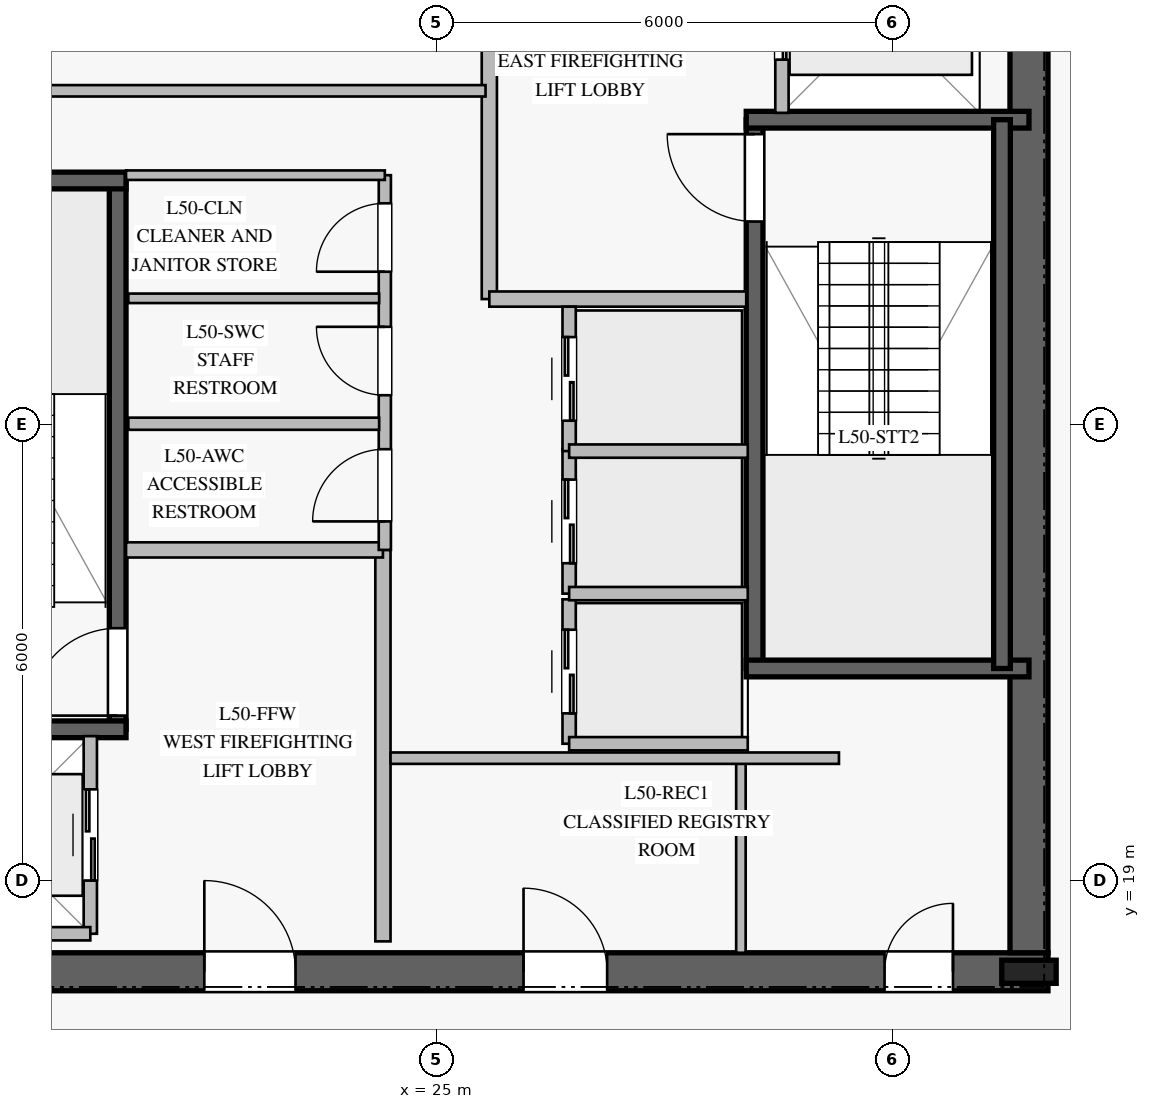
"""IFC4 building model, lengths in metres.
Left out: names, types, materials, properties, quantities, classifications, styles, units other than length and angle.
Written with IfcOpenShell. Run it as: python <this file> out.ifc"""

import sys

from ifc_helpers import new_model, si_unit, direction, frame, frame_2d, origin, origin_2d, place, context, subcontext, project, spatial, rectangle, i_section, extrude, element, fill, save


model = new_model("IFC4")
c1 = context("Model", 3, precision=1e-05, world=origin(), true_north=direction((0.0, 1.0)))
c2 = subcontext(c1, "Body", "Model", "MODEL_VIEW")
j1 = project(units=[si_unit("LENGTHUNIT", "METRE"), si_unit("PLANEANGLEUNIT", "RADIAN")], contexts=[c1])
p1 = place(None, origin())
s1 = spatial("IfcSite", under=j1, at=p1, CompositionType="ELEMENT")
p2 = place(p1, origin())
s2 = spatial("IfcBuilding", under=s1, at=p2, CompositionType="ELEMENT")
p3 = place(p2, frame((0.0, 0.0, 208.8)))
s3 = spatial("IfcBuildingStorey", under=s2, at=p3, CompositionType="ELEMENT", Elevation=208.8)
p4 = place(p3, frame((16.95, 17.8, 0.0), z_axis=(0.0, 0.0, 1.0), x_axis=(1.0, 0.0, 0.0)))
e1 = element("IfcWall", 1, at=p4, inside=s3, PredefinedType="SHEAR", context=c2, shape_type="SweptSolid", body=[
    extrude(rectangle(XDim=16.1, YDim=0.5, at=frame_2d((8.05, 0.0))), origin(), (0.0, 0.0, 1.0), 3.78),
])
p5 = place(p4, frame((5.0, 0.0, 0.0)))
e2 = element("IfcOpeningElement", 2, at=p5, cuts=e1, PredefinedType="OPENING", context=c2, shape_type="SweptSolid", body=[
    extrude(rectangle(XDim=1.2, YDim=2.25, at=frame_2d((0.6, 1.125))), frame((0.0, 0.26, 0.0), z_axis=(0.0, -1.0, 0.0), x_axis=(1.0, 0.0, 0.0)), (0.0, 0.0, 1.0), 0.52),
])
p6 = place(p4, frame((13.95, 0.0, 0.0)))
e3 = element("IfcOpeningElement", 3, at=p6, cuts=e1, PredefinedType="OPENING", context=c2, shape_type="SweptSolid", body=[
    extrude(rectangle(XDim=0.9, YDim=2.1, at=frame_2d((0.45, 1.05))), frame((0.0, 0.26, 0.0), z_axis=(0.0, -1.0, 0.0), x_axis=(1.0, 0.0, 0.0)), (0.0, 0.0, 1.0), 0.52),
])
p7 = place(p4, frame((9.2, 0.0, 0.0)))
e4 = element("IfcOpeningElement", 4, at=p7, cuts=e1, PredefinedType="OPENING", context=c2, shape_type="SweptSolid", body=[
    extrude(rectangle(XDim=1.1, YDim=2.2, at=frame_2d((0.55, 1.1))), frame((0.0, 0.26, 0.0), z_axis=(0.0, -1.0, 0.0), x_axis=(1.0, 0.0, 0.0)), (0.0, 0.0, 1.0), 0.52),
])
p8 = place(p3, frame((32.8, 18.05, 0.0), z_axis=(0.0, 0.0, 1.0), x_axis=(0.0, 1.0, 0.0)))
e5 = element("IfcWall", 5, at=p8, inside=s3, PredefinedType="SHEAR", context=c2, shape_type="SweptSolid", body=[
    extrude(rectangle(XDim=13.9, YDim=0.5, at=frame_2d((6.95, 0.0))), origin(), (0.0, 0.0, 1.0), 3.78),
])
p9 = place(p3, frame((32.8, 17.8, 0.0), z_axis=(0.0, 0.0, 1.0), x_axis=(1.0, 0.0, 0.0)))
e6 = element("IfcColumn", 6, at=p9, inside=s3, PredefinedType="COLUMN", context=c2, shape_type="SweptSolid", body=[
    extrude(i_section(OverallWidth=0.304, OverallDepth=0.716, WebThickness=0.021, FlangeThickness=0.04, at=origin_2d()), origin(), (0.0, 0.0, 1.0), 4.0),
])
p10 = place(p3, frame((20.81, 20.99, 0.0), z_axis=(0.0, 0.0, 1.0), x_axis=(0.0, 1.0, 0.0)))
e7 = element("IfcWall", 7, at=p10, inside=s3, PredefinedType="SOLIDWALL", context=c2, shape_type="SweptSolid", body=[
    extrude(rectangle(XDim=7.22, YDim=0.22, at=frame_2d((3.61, 0.0))), origin(), (0.0, 0.0, 1.0), 3.78),
])
p11 = place(p10, frame((0.18, 0.0, 0.0)))
e8 = element("IfcOpeningElement", 8, at=p11, cuts=e7, PredefinedType="OPENING", context=c2, shape_type="SweptSolid", body=[
    extrude(rectangle(XDim=1.15, YDim=2.2, at=frame_2d((0.575, 1.1))), frame((0.0, 0.12, 0.0), z_axis=(0.0, -1.0, 0.0), x_axis=(1.0, 0.0, 0.0)), (0.0, 0.0, 1.0), 0.24),
])
for number, where, z_axis, x_axis in (
    (9, (17.2, 20.99, 0.0), (0.0, 0.0, 1.0), (1.0, 0.0, 0.0)),
    (10, (17.2, 28.21, 0.0), (0.0, 0.0, 1.0), (1.0, 0.0, 0.0)),
):
    element("IfcWall", number, at=place(p3, frame(where, z_axis=z_axis, x_axis=x_axis)), inside=s3, PredefinedType="SOLIDWALL", context=c2, shape_type="SweptSolid", body=[
        extrude(rectangle(XDim=3.72, YDim=0.22, at=frame_2d((1.86, 0.0))), origin(), (0.0, 0.0, 1.0), 3.78),
    ])
p12 = place(p3, frame((29.19, 21.79, 0.0), z_axis=(0.0, 0.0, 1.0), x_axis=(0.0, 1.0, 0.0)))
e11 = element("IfcWall", 11, at=p12, inside=s3, PredefinedType="SOLIDWALL", context=c2, shape_type="SweptSolid", body=[
    extrude(rectangle(XDim=7.22, YDim=0.22, at=frame_2d((3.61, 0.0))), origin(), (0.0, 0.0, 1.0), 3.78),
])
p13 = place(p12, frame((5.88, 0.0, 0.0)))
e12 = element("IfcOpeningElement", 12, at=p13, cuts=e11, PredefinedType="OPENING", context=c2, shape_type="SweptSolid", body=[
    extrude(rectangle(XDim=1.15, YDim=2.2, at=frame_2d((0.575, 1.1))), frame((0.0, 0.12, 0.0), z_axis=(0.0, -1.0, 0.0), x_axis=(1.0, 0.0, 0.0)), (0.0, 0.0, 1.0), 0.24),
])
for number, where, z_axis, x_axis in (
    (13, (29.08, 21.79, 0.0), (0.0, 0.0, 1.0), (1.0, 0.0, 0.0)),
    (14, (29.08, 29.01, 0.0), (0.0, 0.0, 1.0), (1.0, 0.0, 0.0)),
):
    element("IfcWall", number, at=place(p3, frame(where, z_axis=z_axis, x_axis=x_axis)), inside=s3, PredefinedType="SOLIDWALL", context=c2, shape_type="SweptSolid", body=[
        extrude(rectangle(XDim=3.72, YDim=0.22, at=frame_2d((1.86, 0.0))), origin(), (0.0, 0.0, 1.0), 3.78),
    ])
p14 = place(p3, frame((32.445, 29.01, 0.0), z_axis=(0.0, 0.0, 1.0), x_axis=(0.0, -1.0, 0.0)))
e15 = element("IfcWall", 15, at=p14, inside=s3, PredefinedType="SOLIDWALL", context=c2, shape_type="SweptSolid", body=[
    extrude(rectangle(XDim=7.22, YDim=0.22, at=frame_2d((3.61, 0.0))), origin(), (0.0, 0.0, 1.0), 3.78),
])
p15 = place(p3, frame((24.3, 18.2, 0.0), z_axis=(0.0, 0.0, 1.0), x_axis=(0.0, 1.0, 0.0)))
e16 = element("IfcWall", 16, at=p15, inside=s3, PredefinedType="PARTITIONING", context=c2, shape_type="SweptSolid", body=[
    extrude(rectangle(XDim=5.15, YDim=0.2, at=frame_2d((2.575, 0.0))), origin(), (0.0, 0.0, 1.0), 3.78),
])
p16 = place(p3, frame((20.92, 23.35, 0.0), z_axis=(0.0, 0.0, 1.0), x_axis=(1.0, 0.0, 0.0)))
e17 = element("IfcWall", 17, at=p16, inside=s3, PredefinedType="PARTITIONING", context=c2, shape_type="SweptSolid", body=[
    extrude(rectangle(XDim=3.38, YDim=0.2, at=frame_2d((1.69, 0.0))), origin(), (0.0, 0.0, 1.0), 3.78),
])
p17 = place(p3, frame((25.7, 26.65, 0.0), z_axis=(0.0, 0.0, 1.0), x_axis=(0.0, 1.0, 0.0)))
e18 = element("IfcWall", 18, at=p17, inside=s3, PredefinedType="PARTITIONING", context=c2, shape_type="SweptSolid", body=[
    extrude(rectangle(XDim=5.15, YDim=0.2, at=frame_2d((2.575, 0.0))), origin(), (0.0, 0.0, 1.0), 3.78),
])
p18 = place(p3, frame((25.7, 26.65, 0.0), z_axis=(0.0, 0.0, 1.0), x_axis=(1.0, 0.0, 0.0)))
e19 = element("IfcWall", 19, at=p18, inside=s3, PredefinedType="PARTITIONING", context=c2, shape_type="SweptSolid", body=[
    extrude(rectangle(XDim=3.38, YDim=0.2, at=frame_2d((1.69, 0.0))), origin(), (0.0, 0.0, 1.0), 3.78),
])
p19 = place(p3, frame((24.325, 23.35, 0.0), z_axis=(0.0, 0.0, 1.0), x_axis=(0.0, 1.0, 0.0)))
e20 = element("IfcWall", 20, at=p19, inside=s3, PredefinedType="PLUMBINGWALL", context=c2, shape_type="SweptSolid", body=[
    extrude(rectangle(XDim=4.93, YDim=0.16, at=frame_2d((2.465, 0.0))), origin(), (0.0, 0.0, 1.0), 3.78),
])
p20 = place(p19, frame((0.375, 0.0, 0.0)))
e21 = element("IfcOpeningElement", 21, at=p20, cuts=e20, PredefinedType="OPENING", context=c2, shape_type="SweptSolid", body=[
    extrude(rectangle(XDim=0.95, YDim=2.1, at=frame_2d((0.475, 1.05))), frame((0.0, 0.09, 0.0), z_axis=(0.0, -1.0, 0.0), x_axis=(1.0, 0.0, 0.0)), (0.0, 0.0, 1.0), 0.18),
])
p21 = place(p19, frame((2.035, 0.0, 0.0)))
e22 = element("IfcOpeningElement", 22, at=p21, cuts=e20, PredefinedType="OPENING", context=c2, shape_type="SweptSolid", body=[
    extrude(rectangle(XDim=0.9, YDim=2.1, at=frame_2d((0.45, 1.05))), frame((0.0, 0.09, 0.0), z_axis=(0.0, -1.0, 0.0), x_axis=(1.0, 0.0, 0.0)), (0.0, 0.0, 1.0), 0.18),
])
p22 = place(p19, frame((3.66, 0.0, 0.0)))
e23 = element("IfcOpeningElement", 23, at=p22, cuts=e20, PredefinedType="OPENING", context=c2, shape_type="SweptSolid", body=[
    extrude(rectangle(XDim=0.9, YDim=2.1, at=frame_2d((0.45, 1.05))), frame((0.0, 0.09, 0.0), z_axis=(0.0, -1.0, 0.0), x_axis=(1.0, 0.0, 0.0)), (0.0, 0.0, 1.0), 0.18),
])
p23 = place(p3, frame((20.92, 28.28, 0.0), z_axis=(0.0, 0.0, 1.0), x_axis=(1.0, 0.0, 0.0)))
e24 = element("IfcWall", 24, at=p23, inside=s3, PredefinedType="PARTITIONING", context=c2, shape_type="SweptSolid", body=[
    extrude(rectangle(XDim=3.405, YDim=0.125, at=frame_2d((1.703, 0.0))), origin(), (0.0, 0.0, 1.0), 3.78),
])
p24 = place(p3, frame((29.01, 18.05, 0.0), z_axis=(0.0, 0.0, 1.0), x_axis=(0.0, 1.0, 0.0)))
e25 = element("IfcWall", 25, at=p24, inside=s3, PredefinedType="PARTITIONING", context=c2, shape_type="SweptSolid", body=[
    extrude(rectangle(XDim=2.5, YDim=0.125, at=frame_2d((1.25, 0.0))), origin(), (0.0, 0.0, 1.0), 3.78),
])
p25 = place(p3, frame((20.95, 25.01, 0.0), z_axis=(0.0, 0.0, 1.0), x_axis=(1.0, 0.0, 0.0)))
e26 = element("IfcWall", 26, at=p25, inside=s3, PredefinedType="PLUMBINGWALL", context=c2, shape_type="SweptSolid", body=[
    extrude(rectangle(XDim=3.3, YDim=0.16, at=frame_2d((1.65, 0.0))), origin(), (0.0, 0.0, 1.0), 3.78),
])
p26 = place(p3, frame((20.95, 26.66, 0.0), z_axis=(0.0, 0.0, 1.0), x_axis=(1.0, 0.0, 0.0)))
e27 = element("IfcWall", 27, at=p26, inside=s3, PredefinedType="PARTITIONING", context=c2, shape_type="SweptSolid", body=[
    extrude(rectangle(XDim=3.3, YDim=0.125, at=frame_2d((1.65, 0.0))), origin(), (0.0, 0.0, 1.0), 3.78),
])
p27 = place(p3, frame((24.4, 20.61, 0.0), z_axis=(0.0, 0.0, 1.0), x_axis=(1.0, 0.0, 0.0)))
e28 = element("IfcWall", 28, at=p27, inside=s3, PredefinedType="PARTITIONING", context=c2, shape_type="SweptSolid", body=[
    extrude(rectangle(XDim=5.9, YDim=0.15, at=frame_2d((2.95, 0.0))), origin(), (0.0, 0.0, 1.0), 3.78),
])
p28 = place(p3, frame((19.75, 29.39, 0.0), z_axis=(0.0, 0.0, 1.0), x_axis=(1.0, 0.0, 0.0)))
e29 = element("IfcWall", 29, at=p28, inside=s3, PredefinedType="PARTITIONING", context=c2, shape_type="SweptSolid", body=[
    extrude(rectangle(XDim=5.9, YDim=0.15, at=frame_2d((2.95, 0.0))), origin(), (0.0, 0.0, 1.0), 3.78),
])
p29 = place(p3, frame((26.75, 20.8, 0.0), z_axis=(0.0, 0.0, 1.0), x_axis=(0.0, 1.0, 0.0)))
e30 = element("IfcWall", 30, at=p29, inside=s3, PredefinedType="PARTITIONING", context=c2, shape_type="SweptSolid", body=[
    extrude(rectangle(XDim=1.9, YDim=0.175, at=frame_2d((0.95, 0.0))), origin(), (0.0, 0.0, 1.0), 3.78),
])
p30 = place(p29, frame((0.4, 0.0, 0.0)))
e31 = element("IfcOpeningElement", 31, at=p30, cuts=e30, PredefinedType="OPENING", context=c2, shape_type="SweptSolid", body=[
    extrude(rectangle(XDim=1.1, YDim=2.2, at=frame_2d((0.55, 1.1))), frame((0.0, 0.098, 0.0), z_axis=(0.0, -1.0, 0.0), x_axis=(1.0, 0.0, 0.0)), (0.0, 0.0, 1.0), 0.195),
])
p31 = place(p3, frame((26.75, 20.8, 0.0), z_axis=(0.0, 0.0, 1.0), x_axis=(1.0, 0.0, 0.0)))
e32 = element("IfcWall", 32, at=p31, inside=s3, PredefinedType="PARTITIONING", context=c2, shape_type="SweptSolid", body=[
    extrude(rectangle(XDim=2.35, YDim=0.175, at=frame_2d((1.175, 0.0))), origin(), (0.0, 0.0, 1.0), 3.78),
])
p32 = place(p3, frame((26.75, 22.775, 0.0), z_axis=(0.0, 0.0, 1.0), x_axis=(0.0, 1.0, 0.0)))
e33 = element("IfcWall", 33, at=p32, inside=s3, PredefinedType="PARTITIONING", context=c2, shape_type="SweptSolid", body=[
    extrude(rectangle(XDim=1.9, YDim=0.175, at=frame_2d((0.95, 0.0))), origin(), (0.0, 0.0, 1.0), 3.78),
])
p33 = place(p32, frame((0.4, 0.0, 0.0)))
e34 = element("IfcOpeningElement", 34, at=p33, cuts=e33, PredefinedType="OPENING", context=c2, shape_type="SweptSolid", body=[
    extrude(rectangle(XDim=1.1, YDim=2.2, at=frame_2d((0.55, 1.1))), frame((0.0, 0.098, 0.0), z_axis=(0.0, -1.0, 0.0), x_axis=(1.0, 0.0, 0.0)), (0.0, 0.0, 1.0), 0.195),
])
p34 = place(p3, frame((26.75, 22.775, 0.0), z_axis=(0.0, 0.0, 1.0), x_axis=(1.0, 0.0, 0.0)))
e35 = element("IfcWall", 35, at=p34, inside=s3, PredefinedType="PARTITIONING", context=c2, shape_type="SweptSolid", body=[
    extrude(rectangle(XDim=2.35, YDim=0.175, at=frame_2d((1.175, 0.0))), origin(), (0.0, 0.0, 1.0), 3.78),
])
p35 = place(p3, frame((26.75, 24.65, 0.0), z_axis=(0.0, 0.0, 1.0), x_axis=(0.0, 1.0, 0.0)))
e36 = element("IfcWall", 36, at=p35, inside=s3, PredefinedType="PARTITIONING", context=c2, shape_type="SweptSolid", body=[
    extrude(rectangle(XDim=1.9, YDim=0.175, at=frame_2d((0.95, 0.0))), origin(), (0.0, 0.0, 1.0), 3.78),
])
p36 = place(p35, frame((0.4, 0.0, 0.0)))
e37 = element("IfcOpeningElement", 37, at=p36, cuts=e36, PredefinedType="OPENING", context=c2, shape_type="SweptSolid", body=[
    extrude(rectangle(XDim=1.1, YDim=2.2, at=frame_2d((0.55, 1.1))), frame((0.0, 0.098, 0.0), z_axis=(0.0, -1.0, 0.0), x_axis=(1.0, 0.0, 0.0)), (0.0, 0.0, 1.0), 0.195),
])
p37 = place(p3, frame((26.75, 24.65, 0.0), z_axis=(0.0, 0.0, 1.0), x_axis=(1.0, 0.0, 0.0)))
e38 = element("IfcWall", 38, at=p37, inside=s3, PredefinedType="PARTITIONING", context=c2, shape_type="SweptSolid", body=[
    extrude(rectangle(XDim=2.35, YDim=0.175, at=frame_2d((1.175, 0.0))), origin(), (0.0, 0.0, 1.0), 3.78),
])
p38 = place(p3, frame((20.45, 18.3, 0.0), z_axis=(0.0, 0.0, 1.0), x_axis=(0.0, 1.0, 0.0)))
e39 = element("IfcWall", 39, at=p38, inside=s3, PredefinedType="PARTITIONING", context=c2, shape_type="SweptSolid", body=[
    extrude(rectangle(XDim=2.6, YDim=0.175, at=frame_2d((1.3, 0.0))), origin(), (0.0, 0.0, 1.0), 3.78),
])
p39 = place(p38, frame((0.7, 0.0, 0.0)))
e40 = element("IfcOpeningElement", 40, at=p39, cuts=e39, PredefinedType="OPENING", context=c2, shape_type="SweptSolid", body=[
    extrude(rectangle(XDim=1.2, YDim=2.2, at=frame_2d((0.6, 1.1))), frame((0.0, 0.098, 0.0), z_axis=(0.0, -1.0, 0.0), x_axis=(1.0, 0.0, 0.0)), (0.0, 0.0, 1.0), 0.195),
])
p40 = place(p3, frame((17.85, 18.3, 0.0), z_axis=(0.0, 0.0, 1.0), x_axis=(1.0, 0.0, 0.0)))
e41 = element("IfcWall", 41, at=p40, inside=s3, PredefinedType="PARTITIONING", context=c2, shape_type="SweptSolid", body=[
    extrude(rectangle(XDim=2.6, YDim=0.175, at=frame_2d((1.3, 0.0))), origin(), (0.0, 0.0, 1.0), 3.78),
])
p41 = place(p3, frame((29.55, 29.1, 0.0), z_axis=(0.0, 0.0, 1.0), x_axis=(0.0, 1.0, 0.0)))
e42 = element("IfcWall", 42, at=p41, inside=s3, PredefinedType="PARTITIONING", context=c2, shape_type="SweptSolid", body=[
    extrude(rectangle(XDim=2.6, YDim=0.175, at=frame_2d((1.3, 0.0))), origin(), (0.0, 0.0, 1.0), 3.78),
])
p42 = place(p41, frame((0.7, 0.0, 0.0)))
e43 = element("IfcOpeningElement", 43, at=p42, cuts=e42, PredefinedType="OPENING", context=c2, shape_type="SweptSolid", body=[
    extrude(rectangle(XDim=1.2, YDim=2.2, at=frame_2d((0.6, 1.1))), frame((0.0, 0.098, 0.0), z_axis=(0.0, -1.0, 0.0), x_axis=(1.0, 0.0, 0.0)), (0.0, 0.0, 1.0), 0.195),
])
p43 = place(p11, origin())
e44 = element("IfcDoor", 44, at=p43, inside=s3, OperationType="SINGLE_SWING_LEFT", PredefinedType="DOOR", context=c2, shape_type="SweptSolid", body=[
    extrude(rectangle(XDim=1.15, YDim=2.2, at=frame_2d((0.575, 1.1))), frame((0.0, 0.025, 0.0), z_axis=(0.0, -1.0, 0.0), x_axis=(1.0, 0.0, 0.0)), (0.0, 0.0, 1.0), 0.05),
])
fill(e8, e44)
p44 = place(p13, origin())
e45 = element("IfcDoor", 45, at=p44, inside=s3, OperationType="SINGLE_SWING_RIGHT", PredefinedType="DOOR", context=c2, shape_type="SweptSolid", body=[
    extrude(rectangle(XDim=1.15, YDim=2.2, at=frame_2d((0.575, 1.1))), frame((0.0, 0.025, 0.0), z_axis=(0.0, -1.0, 0.0), x_axis=(1.0, 0.0, 0.0)), (0.0, 0.0, 1.0), 0.05),
])
fill(e12, e45)
p45 = place(p5, origin())
e46 = element("IfcDoor", 46, at=p45, inside=s3, OperationType="SINGLE_SWING_LEFT", PredefinedType="DOOR", context=c2, shape_type="SweptSolid", body=[
    extrude(rectangle(XDim=1.2, YDim=2.25, at=frame_2d((0.6, 1.125))), frame((0.0, 0.025, 0.0), z_axis=(0.0, -1.0, 0.0), x_axis=(1.0, 0.0, 0.0)), (0.0, 0.0, 1.0), 0.05),
])
fill(e2, e46)
p46 = place(p20, origin())
e47 = element("IfcDoor", 47, at=p46, inside=s3, OperationType="SINGLE_SWING_LEFT", PredefinedType="DOOR", context=c2, shape_type="SweptSolid", body=[
    extrude(rectangle(XDim=0.95, YDim=2.1, at=frame_2d((0.475, 1.05))), frame((0.0, 0.025, 0.0), z_axis=(0.0, -1.0, 0.0), x_axis=(1.0, 0.0, 0.0)), (0.0, 0.0, 1.0), 0.05),
])
fill(e21, e47)
p47 = place(p21, origin())
e48 = element("IfcDoor", 48, at=p47, inside=s3, OperationType="SINGLE_SWING_RIGHT", PredefinedType="DOOR", context=c2, shape_type="SweptSolid", body=[
    extrude(rectangle(XDim=0.9, YDim=2.1, at=frame_2d((0.45, 1.05))), frame((0.0, 0.025, 0.0), z_axis=(0.0, -1.0, 0.0), x_axis=(1.0, 0.0, 0.0)), (0.0, 0.0, 1.0), 0.05),
])
fill(e22, e48)
p48 = place(p22, origin())
e49 = element("IfcDoor", 49, at=p48, inside=s3, OperationType="SINGLE_SWING_LEFT", PredefinedType="DOOR", context=c2, shape_type="SweptSolid", body=[
    extrude(rectangle(XDim=0.9, YDim=2.1, at=frame_2d((0.45, 1.05))), frame((0.0, 0.025, 0.0), z_axis=(0.0, -1.0, 0.0), x_axis=(1.0, 0.0, 0.0)), (0.0, 0.0, 1.0), 0.05),
])
fill(e23, e49)
p49 = place(p6, origin())
e50 = element("IfcDoor", 50, at=p49, inside=s3, OperationType="SINGLE_SWING_RIGHT", PredefinedType="DOOR", context=c2, shape_type="SweptSolid", body=[
    extrude(rectangle(XDim=0.9, YDim=2.1, at=frame_2d((0.45, 1.05))), frame((0.0, 0.025, 0.0), z_axis=(0.0, -1.0, 0.0), x_axis=(1.0, 0.0, 0.0)), (0.0, 0.0, 1.0), 0.05),
])
fill(e3, e50)
p50 = place(p7, origin())
e51 = element("IfcDoor", 51, at=p50, inside=s3, OperationType="SINGLE_SWING_LEFT", PredefinedType="DOOR", context=c2, shape_type="SweptSolid", body=[
    extrude(rectangle(XDim=1.1, YDim=2.2, at=frame_2d((0.55, 1.1))), frame((0.0, 0.025, 0.0), z_axis=(0.0, -1.0, 0.0), x_axis=(1.0, 0.0, 0.0)), (0.0, 0.0, 1.0), 0.05),
])
fill(e4, e51)
p51 = place(p30, origin())
e52 = element("IfcDoor", 52, at=p51, inside=s3, OperationType="DOUBLE_DOOR_SLIDING", PredefinedType="DOOR", context=c2, shape_type="SweptSolid", body=[
    extrude(rectangle(XDim=1.1, YDim=2.2, at=frame_2d((0.55, 1.1))), frame((0.0, 0.025, 0.0), z_axis=(0.0, -1.0, 0.0), x_axis=(1.0, 0.0, 0.0)), (0.0, 0.0, 1.0), 0.05),
])
fill(e31, e52)
p52 = place(p33, origin())
e53 = element("IfcDoor", 53, at=p52, inside=s3, OperationType="DOUBLE_DOOR_SLIDING", PredefinedType="DOOR", context=c2, shape_type="SweptSolid", body=[
    extrude(rectangle(XDim=1.1, YDim=2.2, at=frame_2d((0.55, 1.1))), frame((0.0, 0.025, 0.0), z_axis=(0.0, -1.0, 0.0), x_axis=(1.0, 0.0, 0.0)), (0.0, 0.0, 1.0), 0.05),
])
fill(e34, e53)
p53 = place(p36, origin())
e54 = element("IfcDoor", 54, at=p53, inside=s3, OperationType="DOUBLE_DOOR_SLIDING", PredefinedType="DOOR", context=c2, shape_type="SweptSolid", body=[
    extrude(rectangle(XDim=1.1, YDim=2.2, at=frame_2d((0.55, 1.1))), frame((0.0, 0.025, 0.0), z_axis=(0.0, -1.0, 0.0), x_axis=(1.0, 0.0, 0.0)), (0.0, 0.0, 1.0), 0.05),
])
fill(e37, e54)
p54 = place(p39, origin())
e55 = element("IfcDoor", 55, at=p54, inside=s3, OperationType="DOUBLE_DOOR_SLIDING", PredefinedType="DOOR", context=c2, shape_type="SweptSolid", body=[
    extrude(rectangle(XDim=1.2, YDim=2.2, at=frame_2d((0.6, 1.1))), frame((0.0, 0.025, 0.0), z_axis=(0.0, -1.0, 0.0), x_axis=(1.0, 0.0, 0.0)), (0.0, 0.0, 1.0), 0.05),
])
fill(e40, e55)
p55 = place(p42, origin())
e56 = element("IfcDoor", 56, at=p55, inside=s3, OperationType="DOUBLE_DOOR_SLIDING", PredefinedType="DOOR", context=c2, shape_type="SweptSolid", body=[
    extrude(rectangle(XDim=1.2, YDim=2.2, at=frame_2d((0.6, 1.1))), frame((0.0, 0.025, 0.0), z_axis=(0.0, -1.0, 0.0), x_axis=(1.0, 0.0, 0.0)), (0.0, 0.0, 1.0), 0.05),
])
fill(e43, e56)
save(model, sys.argv[1])
